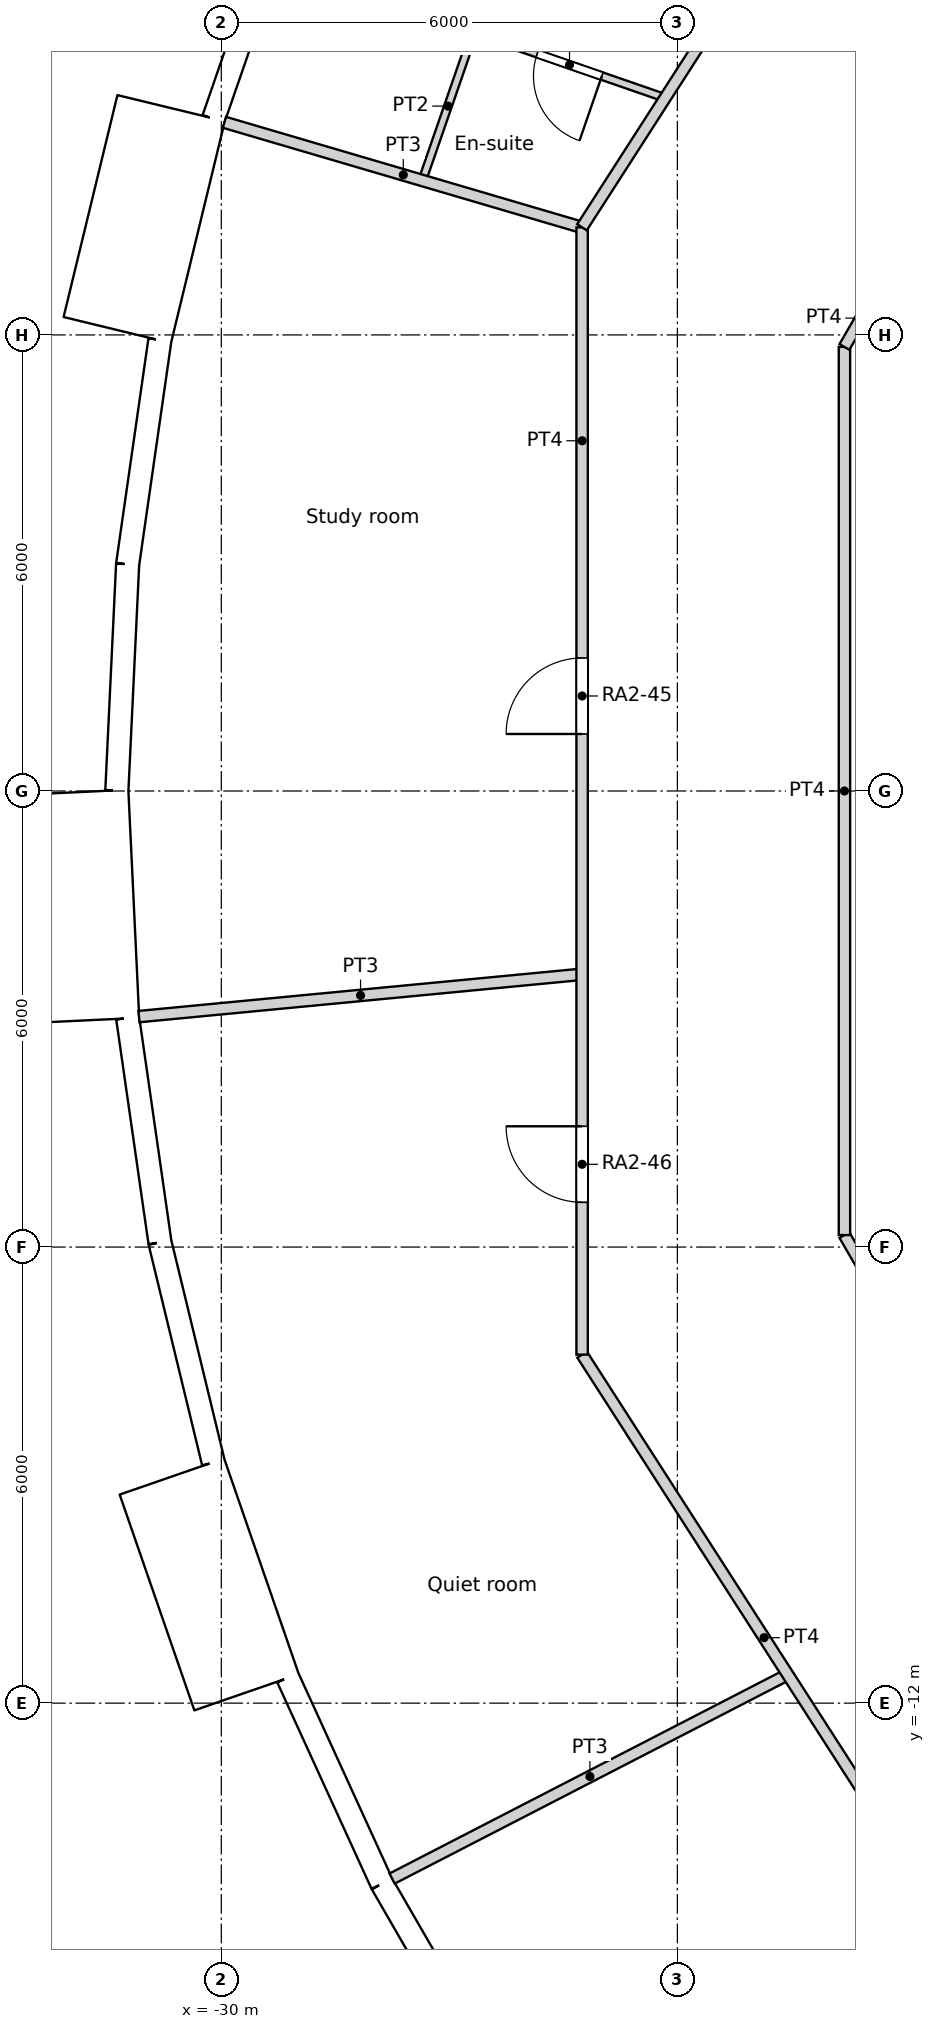
"""IFC4 building model, lengths in metres.
Left out: names, types, materials, properties, quantities, classifications, styles, units other than length and angle.
Written with IfcOpenShell. Run it as: python <this file> out.ifc"""

import sys

from ifc_helpers import new_model, si_unit, direction, frame, frame_2d, origin, origin_2d, place, context, subcontext, project, spatial, rectangle, circle, extrude, element, fill, save


model = new_model("IFC4")
c1 = context("Model", 3, precision=1e-05, world=origin(), true_north=direction((0.0, 1.0)))
c2 = subcontext(c1, "Body", "Model", "MODEL_VIEW")
j1 = project(units=[si_unit("LENGTHUNIT", "METRE"), si_unit("PLANEANGLEUNIT", "RADIAN")], contexts=[c1])
p1 = place(None, origin())
s1 = spatial("IfcSite", under=j1, at=p1, CompositionType="ELEMENT")
p2 = place(p1, origin())
s2 = spatial("IfcBuilding", under=s1, at=p2, CompositionType="ELEMENT")
p3 = place(p2, frame((0.0, 0.0, 39.0)))
s3 = spatial("IfcBuildingStorey", under=s2, at=p3, CompositionType="ELEMENT", Elevation=39.0)
for number, where, z_axis, x_axis in (
    (1, (-29.048, 8.529, 0.0), (0.0, 0.0, 1.0), (1.0, 0.0, 0.0)),
    (2, (-30.137, 2.878, 0.0), (0.0, 0.0, 1.0), (1.0, 0.0, 0.0)),
    (3, (-30.137, -2.878, 0.0), (0.0, 0.0, 1.0), (1.0, 0.0, 0.0)),
    (4, (-29.048, -8.529, 0.0), (0.0, 0.0, 1.0), (1.0, 0.0, 0.0)),
    (5, (-26.909, -13.873, 0.0), (0.0, 0.0, 1.0), (1.0, 0.0, 0.0)),
):
    element("IfcColumn", number, at=place(p3, frame(where, z_axis=z_axis, x_axis=x_axis)), inside=s3, PredefinedType="COLUMN", context=c2, shape_type="SweptSolid", body=[
        extrude(circle(Radius=0.7, at=origin_2d()), origin(), (0.0, 0.0, 1.0), 3.6),
    ])
for number, where, z_axis, x_axis in (
    (6, (-23.067, 8.396, 0.0), (0.0, 0.0, 1.0), (1.0, 0.0, 0.0)),
    (7, (-24.382, 2.85, 0.0), (0.0, 0.0, 1.0), (1.0, 0.0, 0.0)),
    (8, (-24.382, -2.85, 0.0), (0.0, 0.0, 1.0), (1.0, 0.0, 0.0)),
    (9, (-23.067, -8.396, 0.0), (0.0, 0.0, 1.0), (1.0, 0.0, 0.0)),
):
    element("IfcColumn", number, at=place(p3, frame(where, z_axis=z_axis, x_axis=x_axis)), inside=s3, PredefinedType="COLUMN", context=c2, shape_type="SweptSolid", body=[
        extrude(circle(Radius=0.75, at=origin_2d()), origin(), (0.0, 0.0, 1.0), 3.6),
    ])
p4 = place(p3, frame((-29.127, 11.661, 0.0), z_axis=(0.0, 0.0, 1.0), x_axis=(-0.327096492592, -0.944990944154, 0.0)))
e10 = element("IfcWall", 10, at=p4, inside=s3, PredefinedType="SOLIDWALL", context=c2, shape_type="SweptSolid", body=[
    extrude(rectangle(XDim=2.979, YDim=0.3, at=frame_2d((1.49, 0.0))), origin(), (0.0, 0.0, 1.0), 3.15),
])
p5 = place(p4, frame((1.49, 0.0, 1.55)))
e11 = element("IfcOpeningElement", 11, at=p5, cuts=e10, PredefinedType="OPENING", context=c2, shape_type="SweptSolid", body=[
    extrude(circle(Radius=0.9, at=origin_2d()), frame((0.0, 0.16, 0.0), z_axis=(0.0, -1.0, 0.0), x_axis=(1.0, 0.0, 0.0)), (0.0, 0.0, 1.0), 0.32),
])
p6 = place(p3, frame((-30.661, 8.982, -0.45), z_axis=(0.0, 0.0, 1.0), x_axis=(-0.235751415068, -0.971813392732, 0.0)))
e12 = element("IfcWall", 12, at=p6, inside=s3, PredefinedType="ELEMENTEDWALL", context=c2, shape_type="SweptSolid", body=[
    extrude(rectangle(XDim=3.0, YDim=1.45, at=frame_2d((1.5, 0.0))), origin(), (0.0, 0.0, 1.0), 3.6),
])
p7 = place(p6, frame((1.5, 0.0, 2.0)))
e13 = element("IfcOpeningElement", 13, at=p7, cuts=e12, PredefinedType="OPENING", context=c2, shape_type="SweptSolid", body=[
    extrude(circle(Radius=0.9, at=origin_2d()), frame((0.0, 0.735, 0.0), z_axis=(0.0, -1.0, 0.0), x_axis=(1.0, 0.0, 0.0)), (0.0, 0.0, 1.0), 1.47),
])
p8 = place(p3, frame((-30.808, 5.932, 0.0), z_axis=(0.0, 0.0, 1.0), x_axis=(-0.142327539111, -0.989819615693, 0.0)))
e14 = element("IfcWall", 14, at=p8, inside=s3, PredefinedType="SOLIDWALL", context=c2, shape_type="SweptSolid", body=[
    extrude(rectangle(XDim=2.979, YDim=0.3, at=frame_2d((1.49, 0.0))), origin(), (0.0, 0.0, 1.0), 3.15),
])
p9 = place(p8, frame((1.49, 0.0, 1.55)))
e15 = element("IfcOpeningElement", 15, at=p9, cuts=e14, PredefinedType="OPENING", context=c2, shape_type="SweptSolid", body=[
    extrude(circle(Radius=0.9, at=origin_2d()), frame((0.0, 0.16, 0.0), z_axis=(0.0, -1.0, 0.0), x_axis=(1.0, 0.0, 0.0)), (0.0, 0.0, 1.0), 0.32),
])
p10 = place(p3, frame((-31.232, 2.982, 0.0), z_axis=(0.0, 0.0, 1.0), x_axis=(-0.047522328113, -0.998870175914, 0.0)))
e16 = element("IfcWall", 16, at=p10, inside=s3, PredefinedType="SOLIDWALL", context=c2, shape_type="SweptSolid", body=[
    extrude(rectangle(XDim=2.98, YDim=0.3, at=frame_2d((1.49, 0.0))), origin(), (0.0, 0.0, 1.0), 3.15),
])
p11 = place(p10, frame((1.49, 0.0, 1.55)))
e17 = element("IfcOpeningElement", 17, at=p11, cuts=e16, PredefinedType="OPENING", context=c2, shape_type="SweptSolid", body=[
    extrude(circle(Radius=0.9, at=origin_2d()), frame((0.0, 0.16, 0.0), z_axis=(0.0, -1.0, 0.0), x_axis=(1.0, 0.0, 0.0)), (0.0, 0.0, 1.0), 0.32),
])
p12 = place(p3, frame((-31.949, -0.02, -0.45), z_axis=(0.0, 0.0, 1.0), x_axis=(0.047607680889, -0.998866111509, 0.0)))
e18 = element("IfcWall", 18, at=p12, inside=s3, PredefinedType="ELEMENTEDWALL", context=c2, shape_type="SweptSolid", body=[
    extrude(rectangle(XDim=3.0, YDim=1.45, at=frame_2d((1.5, 0.0))), origin(), (0.0, 0.0, 1.0), 3.6),
])
p13 = place(p12, frame((1.5, 0.0, 2.0)))
e19 = element("IfcOpeningElement", 19, at=p13, cuts=e18, PredefinedType="OPENING", context=c2, shape_type="SweptSolid", body=[
    extrude(circle(Radius=0.9, at=origin_2d()), frame((0.0, 0.735, 0.0), z_axis=(0.0, -1.0, 0.0), x_axis=(1.0, 0.0, 0.0)), (0.0, 0.0, 1.0), 1.47),
])
p14 = place(p3, frame((-31.231, -2.988, 0.0), z_axis=(0.0, 0.0, 1.0), x_axis=(0.142315996627, -0.989821275334, 0.0)))
e20 = element("IfcWall", 20, at=p14, inside=s3, PredefinedType="SOLIDWALL", context=c2, shape_type="SweptSolid", body=[
    extrude(rectangle(XDim=2.98, YDim=0.3, at=frame_2d((1.49, 0.0))), origin(), (0.0, 0.0, 1.0), 3.15),
])
p15 = place(p14, frame((1.49, 0.0, 1.55)))
e21 = element("IfcOpeningElement", 21, at=p15, cuts=e20, PredefinedType="OPENING", context=c2, shape_type="SweptSolid", body=[
    extrude(circle(Radius=0.9, at=origin_2d()), frame((0.0, 0.16, 0.0), z_axis=(0.0, -1.0, 0.0), x_axis=(1.0, 0.0, 0.0)), (0.0, 0.0, 1.0), 0.32),
])
p16 = place(p3, frame((-30.807, -5.938, 0.0), z_axis=(0.0, 0.0, 1.0), x_axis=(0.235743081534, -0.971815414319, 0.0)))
e22 = element("IfcWall", 22, at=p16, inside=s3, PredefinedType="SOLIDWALL", context=c2, shape_type="SweptSolid", body=[
    extrude(rectangle(XDim=2.979, YDim=0.3, at=frame_2d((1.49, 0.0))), origin(), (0.0, 0.0, 1.0), 3.15),
])
p17 = place(p16, frame((1.49, 0.0, 1.55)))
e23 = element("IfcOpeningElement", 23, at=p17, cuts=e22, PredefinedType="OPENING", context=c2, shape_type="SweptSolid", body=[
    extrude(circle(Radius=0.9, at=origin_2d()), frame((0.0, 0.16, 0.0), z_axis=(0.0, -1.0, 0.0), x_axis=(1.0, 0.0, 0.0)), (0.0, 0.0, 1.0), 0.32),
])
p18 = place(p3, frame((-30.649, -9.021, -0.45), z_axis=(0.0, 0.0, 1.0), x_axis=(0.327071431777, -0.944999618262, 0.0)))
e24 = element("IfcWall", 24, at=p18, inside=s3, PredefinedType="ELEMENTEDWALL", context=c2, shape_type="SweptSolid", body=[
    extrude(rectangle(XDim=3.0, YDim=1.45, at=frame_2d((1.5, 0.0))), origin(), (0.0, 0.0, 1.0), 3.6),
])
p19 = place(p18, frame((1.5, 0.0, 2.0)))
e25 = element("IfcOpeningElement", 25, at=p19, cuts=e24, PredefinedType="OPENING", context=c2, shape_type="SweptSolid", body=[
    extrude(circle(Radius=0.9, at=origin_2d()), frame((0.0, 0.735, 0.0), z_axis=(0.0, -1.0, 0.0), x_axis=(1.0, 0.0, 0.0)), (0.0, 0.0, 1.0), 1.47),
])
p20 = place(p3, frame((-29.125, -11.666, 0.0), z_axis=(0.0, 0.0, 1.0), x_axis=(0.415407317162, -0.909635509888, 0.0)))
e26 = element("IfcWall", 26, at=p20, inside=s3, PredefinedType="SOLIDWALL", context=c2, shape_type="SweptSolid", body=[
    extrude(rectangle(XDim=2.98, YDim=0.3, at=frame_2d((1.49, 0.0))), origin(), (0.0, 0.0, 1.0), 3.15),
])
p21 = place(p20, frame((1.49, 0.0, 1.55)))
e27 = element("IfcOpeningElement", 27, at=p21, cuts=e26, PredefinedType="OPENING", context=c2, shape_type="SweptSolid", body=[
    extrude(circle(Radius=0.9, at=origin_2d()), frame((0.0, 0.16, 0.0), z_axis=(0.0, -1.0, 0.0), x_axis=(1.0, 0.0, 0.0)), (0.0, 0.0, 1.0), 0.32),
])
p22 = place(p3, frame((-27.887, -14.377, 0.0), z_axis=(0.0, 0.0, 1.0), x_axis=(0.499999078476, -0.866025935826, 0.0)))
e28 = element("IfcWall", 28, at=p22, inside=s3, PredefinedType="SOLIDWALL", context=c2, shape_type="SweptSolid", body=[
    extrude(rectangle(XDim=2.979, YDim=0.3, at=frame_2d((1.49, 0.0))), origin(), (0.0, 0.0, 1.0), 3.15),
])
p23 = place(p22, frame((1.49, 0.0, 1.55)))
e29 = element("IfcOpeningElement", 29, at=p23, cuts=e28, PredefinedType="OPENING", context=c2, shape_type="SweptSolid", body=[
    extrude(circle(Radius=0.9, at=origin_2d()), frame((0.0, 0.16, 0.0), z_axis=(0.0, -1.0, 0.0), x_axis=(1.0, 0.0, 0.0)), (0.0, 0.0, 1.0), 0.32),
])
p24 = place(p3, frame((-25.255, 7.416, 0.0), z_axis=(0.0, 0.0, 1.0), x_axis=(0.540805851332, 0.841147449123, 0.0)))
e30 = element("IfcWall", 30, at=p24, inside=s3, PredefinedType="PARTITIONING", context=c2, shape_type="SweptSolid", body=[
    extrude(rectangle(XDim=14.829, YDim=0.15, at=frame_2d((7.415, 0.0))), origin(), (0.0, 0.0, 1.0), 3.15),
])
p25 = place(p24, frame((5.453, 0.0, 0.0)))
e31 = element("IfcOpeningElement", 31, at=p25, cuts=e30, PredefinedType="OPENING", context=c2, shape_type="SweptSolid", body=[
    extrude(rectangle(XDim=1.0, YDim=2.1, at=frame_2d((0.5, 1.05))), frame((0.0, 0.075, 0.0), z_axis=(0.0, -1.0, 0.0), x_axis=(1.0, 0.0, 0.0)), (0.0, 0.0, 1.0), 0.15),
])
p26 = place(p24, frame((3.013, 0.0, 0.0)))
e32 = element("IfcOpeningElement", 32, at=p26, cuts=e30, PredefinedType="OPENING", context=c2, shape_type="SweptSolid", body=[
    extrude(rectangle(XDim=1.0, YDim=2.1, at=frame_2d((0.5, 1.05))), frame((0.0, 0.075, 0.0), z_axis=(0.0, -1.0, 0.0), x_axis=(1.0, 0.0, 0.0)), (0.0, 0.0, 1.0), 0.15),
])
p27 = place(p3, frame((-21.802, 5.842, 0.0), z_axis=(0.0, 0.0, 1.0), x_axis=(0.500277597875, 0.865865073245, 0.0)))
e33 = element("IfcWall", 33, at=p27, inside=s3, PredefinedType="PARTITIONING", context=c2, shape_type="SweptSolid", body=[
    extrude(rectangle(XDim=0.875, YDim=0.15, at=frame_2d((0.438, 0.0))), origin(), (0.0, 0.0, 1.0), 3.15),
])
p28 = place(p3, frame((-21.802, -5.842, 0.0), z_axis=(0.0, 0.0, 1.0), x_axis=(0.0, 1.0, 0.0)))
e34 = element("IfcWall", 34, at=p28, inside=s3, PredefinedType="PARTITIONING", context=c2, shape_type="SweptSolid", body=[
    extrude(rectangle(XDim=11.684, YDim=0.15, at=frame_2d((5.842, 0.0))), origin(), (0.0, 0.0, 1.0), 3.15),
])
p29 = place(p3, frame((-21.802, -5.842, 0.0), z_axis=(0.0, 0.0, 1.0), x_axis=(0.500277597875, -0.865865073245, 0.0)))
e35 = element("IfcWall", 35, at=p29, inside=s3, PredefinedType="PARTITIONING", context=c2, shape_type="SweptSolid", body=[
    extrude(rectangle(XDim=0.875, YDim=0.15, at=frame_2d((0.438, 0.0))), origin(), (0.0, 0.0, 1.0), 3.15),
])
p30 = place(p3, frame((-25.253, -7.415, 0.0), z_axis=(0.0, 0.0, 1.0), x_axis=(0.0, 1.0, 0.0)))
e36 = element("IfcWall", 36, at=p30, inside=s3, PredefinedType="PARTITIONING", context=c2, shape_type="SweptSolid", body=[
    extrude(rectangle(XDim=14.83, YDim=0.15, at=frame_2d((7.415, 0.0))), origin(), (0.0, 0.0, 1.0), 3.15),
])
p31 = place(p30, frame((8.165, 0.0, 0.0)))
e37 = element("IfcOpeningElement", 37, at=p31, cuts=e36, PredefinedType="OPENING", context=c2, shape_type="SweptSolid", body=[
    extrude(rectangle(XDim=1.0, YDim=2.04, at=frame_2d((0.5, 1.02))), frame((0.0, 0.075, 0.0), z_axis=(0.0, -1.0, 0.0), x_axis=(1.0, 0.0, 0.0)), (0.0, 0.0, 1.0), 0.15),
])
p32 = place(p30, frame((2.004, 0.0, 0.0)))
e38 = element("IfcOpeningElement", 38, at=p32, cuts=e36, PredefinedType="OPENING", context=c2, shape_type="SweptSolid", body=[
    extrude(rectangle(XDim=1.0, YDim=2.04, at=frame_2d((0.5, 1.02))), frame((0.0, 0.075, 0.0), z_axis=(0.0, -1.0, 0.0), x_axis=(1.0, 0.0, 0.0)), (0.0, 0.0, 1.0), 0.15),
])
p33 = place(p3, frame((-25.253, -7.415, 0.0), z_axis=(0.0, 0.0, 1.0), x_axis=(0.540656073354, -0.841243728265, 0.0)))
e39 = element("IfcWall", 39, at=p33, inside=s3, PredefinedType="PARTITIONING", context=c2, shape_type="SweptSolid", body=[
    extrude(rectangle(XDim=14.829, YDim=0.15, at=frame_2d((7.415, 0.0))), origin(), (0.0, 0.0, 1.0), 3.15),
])
p34 = place(p33, frame((8.903, 0.0, 0.0)))
e40 = element("IfcOpeningElement", 40, at=p34, cuts=e39, PredefinedType="OPENING", context=c2, shape_type="SweptSolid", body=[
    extrude(rectangle(XDim=1.8, YDim=2.1, at=frame_2d((0.9, 1.05))), frame((0.0, 0.075, 0.0), z_axis=(0.0, -1.0, 0.0), x_axis=(1.0, 0.0, 0.0)), (0.0, 0.0, 1.0), 0.15),
])
p35 = place(p3, frame((-26.679, 9.989, 0.0), z_axis=(0.0, 0.0, 1.0), x_axis=(0.945014370431, -0.327028805578, 0.0)))
e41 = element("IfcWall", 41, at=p35, inside=s3, PredefinedType="PARTITIONING", context=c2, shape_type="SweptSolid", body=[
    extrude(rectangle(XDim=2.667, YDim=0.1, at=frame_2d((1.333, 0.0))), origin(), (0.0, 0.0, 1.0), 3.15),
])
p36 = place(p35, frame((0.884, 0.0, 0.0)))
e42 = element("IfcOpeningElement", 42, at=p36, cuts=e41, PredefinedType="OPENING", context=c2, shape_type="SweptSolid", body=[
    extrude(rectangle(XDim=0.9, YDim=2.04, at=frame_2d((0.45, 1.02))), frame((0.0, 0.05, 0.0), z_axis=(0.0, -1.0, 0.0), x_axis=(1.0, 0.0, 0.0)), (0.0, 0.0, 1.0), 0.1),
])
p37 = place(p3, frame((-27.356, 8.032, 0.0), z_axis=(0.0, 0.0, 1.0), x_axis=(0.326924291943, 0.945050531632, 0.0)))
e43 = element("IfcWall", 43, at=p37, inside=s3, PredefinedType="PARTITIONING", context=c2, shape_type="SweptSolid", body=[
    extrude(rectangle(XDim=2.071, YDim=0.1, at=frame_2d((1.035, 0.0))), origin(), (0.0, 0.0, 1.0), 3.15),
])
p38 = place(p3, frame((-29.959, 8.797, 0.0), z_axis=(0.0, 0.0, 1.0), x_axis=(0.95941700717, -0.281991145876, 0.0)))
e44 = element("IfcWall", 44, at=p38, inside=s3, PredefinedType="PARTITIONING", context=c2, shape_type="SweptSolid", body=[
    extrude(rectangle(XDim=4.905, YDim=0.15, at=frame_2d((2.452, 0.0))), origin(), (0.0, 0.0, 1.0), 3.15),
])
p39 = place(p3, frame((-31.083, -2.968, 0.0), z_axis=(0.0, 0.0, 1.0), x_axis=(0.995465070325, 0.095127775983, 0.0)))
e45 = element("IfcWall", 45, at=p39, inside=s3, PredefinedType="PARTITIONING", context=c2, shape_type="SweptSolid", body=[
    extrude(rectangle(XDim=5.857, YDim=0.15, at=frame_2d((2.928, 0.0))), origin(), (0.0, 0.0, 1.0), 3.15),
])
p40 = place(p3, frame((-27.753, -14.308, 0.0), z_axis=(0.0, 0.0, 1.0), x_axis=(0.88877955153, 0.45833493079, 0.0)))
e46 = element("IfcWall", 46, at=p40, inside=s3, PredefinedType="PARTITIONING", context=c2, shape_type="SweptSolid", body=[
    extrude(rectangle(XDim=5.856, YDim=0.15, at=frame_2d((2.928, 0.0))), origin(), (0.0, 0.0, 1.0), 3.15),
])
p41 = place(p5, origin())
e47 = element("IfcWindow", 47, at=p41, inside=s3, PartitioningType="SINGLE_PANEL", PredefinedType="WINDOW", context=c2, shape_type="SweptSolid", body=[
    extrude(circle(Radius=0.9, at=origin_2d()), frame((0.0, 0.12, 0.0), z_axis=(0.0, -1.0, 0.0), x_axis=(1.0, 0.0, 0.0)), (0.0, 0.0, 1.0), 0.1),
])
fill(e11, e47)
p42 = place(p7, origin())
e48 = element("IfcWindow", 48, at=p42, inside=s3, PartitioningType="SINGLE_PANEL", PredefinedType="WINDOW", context=c2, shape_type="SweptSolid", body=[
    extrude(circle(Radius=0.9, at=origin_2d()), frame((0.0, 0.695, 0.0), z_axis=(0.0, -1.0, 0.0), x_axis=(1.0, 0.0, 0.0)), (0.0, 0.0, 1.0), 0.1),
])
fill(e13, e48)
p43 = place(p9, origin())
e49 = element("IfcWindow", 49, at=p43, inside=s3, PartitioningType="SINGLE_PANEL", PredefinedType="WINDOW", context=c2, shape_type="SweptSolid", body=[
    extrude(circle(Radius=0.9, at=origin_2d()), frame((0.0, 0.12, 0.0), z_axis=(0.0, -1.0, 0.0), x_axis=(1.0, 0.0, 0.0)), (0.0, 0.0, 1.0), 0.1),
])
fill(e15, e49)
p44 = place(p11, origin())
e50 = element("IfcWindow", 50, at=p44, inside=s3, PartitioningType="SINGLE_PANEL", PredefinedType="WINDOW", context=c2, shape_type="SweptSolid", body=[
    extrude(circle(Radius=0.9, at=origin_2d()), frame((0.0, 0.12, 0.0), z_axis=(0.0, -1.0, 0.0), x_axis=(1.0, 0.0, 0.0)), (0.0, 0.0, 1.0), 0.1),
])
fill(e17, e50)
p45 = place(p13, origin())
e51 = element("IfcWindow", 51, at=p45, inside=s3, PartitioningType="SINGLE_PANEL", PredefinedType="WINDOW", context=c2, shape_type="SweptSolid", body=[
    extrude(circle(Radius=0.9, at=origin_2d()), frame((0.0, 0.695, 0.0), z_axis=(0.0, -1.0, 0.0), x_axis=(1.0, 0.0, 0.0)), (0.0, 0.0, 1.0), 0.1),
])
fill(e19, e51)
p46 = place(p15, origin())
e52 = element("IfcWindow", 52, at=p46, inside=s3, PartitioningType="SINGLE_PANEL", PredefinedType="WINDOW", context=c2, shape_type="SweptSolid", body=[
    extrude(circle(Radius=0.9, at=origin_2d()), frame((0.0, 0.12, 0.0), z_axis=(0.0, -1.0, 0.0), x_axis=(1.0, 0.0, 0.0)), (0.0, 0.0, 1.0), 0.1),
])
fill(e21, e52)
p47 = place(p17, origin())
e53 = element("IfcWindow", 53, at=p47, inside=s3, PartitioningType="SINGLE_PANEL", PredefinedType="WINDOW", context=c2, shape_type="SweptSolid", body=[
    extrude(circle(Radius=0.9, at=origin_2d()), frame((0.0, 0.12, 0.0), z_axis=(0.0, -1.0, 0.0), x_axis=(1.0, 0.0, 0.0)), (0.0, 0.0, 1.0), 0.1),
])
fill(e23, e53)
p48 = place(p19, origin())
e54 = element("IfcWindow", 54, at=p48, inside=s3, PartitioningType="SINGLE_PANEL", PredefinedType="WINDOW", context=c2, shape_type="SweptSolid", body=[
    extrude(circle(Radius=0.9, at=origin_2d()), frame((0.0, 0.695, 0.0), z_axis=(0.0, -1.0, 0.0), x_axis=(1.0, 0.0, 0.0)), (0.0, 0.0, 1.0), 0.1),
])
fill(e25, e54)
p49 = place(p21, origin())
e55 = element("IfcWindow", 55, at=p49, inside=s3, PartitioningType="SINGLE_PANEL", PredefinedType="WINDOW", context=c2, shape_type="SweptSolid", body=[
    extrude(circle(Radius=0.9, at=origin_2d()), frame((0.0, 0.12, 0.0), z_axis=(0.0, -1.0, 0.0), x_axis=(1.0, 0.0, 0.0)), (0.0, 0.0, 1.0), 0.1),
])
fill(e27, e55)
p50 = place(p23, origin())
e56 = element("IfcWindow", 56, at=p50, inside=s3, PartitioningType="SINGLE_PANEL", PredefinedType="WINDOW", context=c2, shape_type="SweptSolid", body=[
    extrude(circle(Radius=0.9, at=origin_2d()), frame((0.0, 0.12, 0.0), z_axis=(0.0, -1.0, 0.0), x_axis=(1.0, 0.0, 0.0)), (0.0, 0.0, 1.0), 0.1),
])
fill(e29, e56)
p51 = place(p36, origin())
e57 = element("IfcDoor", 57, at=p51, inside=s3, OperationType="SINGLE_SWING_LEFT", PredefinedType="DOOR", context=c2, shape_type="SweptSolid", body=[
    extrude(rectangle(XDim=0.9, YDim=2.04, at=frame_2d((0.45, 1.02))), frame((0.0, 0.025, 0.0), z_axis=(0.0, -1.0, 0.0), x_axis=(1.0, 0.0, 0.0)), (0.0, 0.0, 1.0), 0.05),
])
fill(e42, e57)
p52 = place(p31, origin())
e58 = element("IfcDoor", 58, at=p52, inside=s3, OperationType="SINGLE_SWING_LEFT", PredefinedType="DOOR", context=c2, shape_type="SweptSolid", body=[
    extrude(rectangle(XDim=1.0, YDim=2.04, at=frame_2d((0.5, 1.02))), frame((0.0, 0.025, 0.0), z_axis=(0.0, -1.0, 0.0), x_axis=(1.0, 0.0, 0.0)), (0.0, 0.0, 1.0), 0.05),
])
fill(e37, e58)
p53 = place(p32, origin())
e59 = element("IfcDoor", 59, at=p53, inside=s3, OperationType="SINGLE_SWING_RIGHT", PredefinedType="DOOR", context=c2, shape_type="SweptSolid", body=[
    extrude(rectangle(XDim=1.0, YDim=2.04, at=frame_2d((0.5, 1.02))), frame((0.0, 0.025, 0.0), z_axis=(0.0, -1.0, 0.0), x_axis=(1.0, 0.0, 0.0)), (0.0, 0.0, 1.0), 0.05),
])
fill(e38, e59)
save(model, sys.argv[1])
